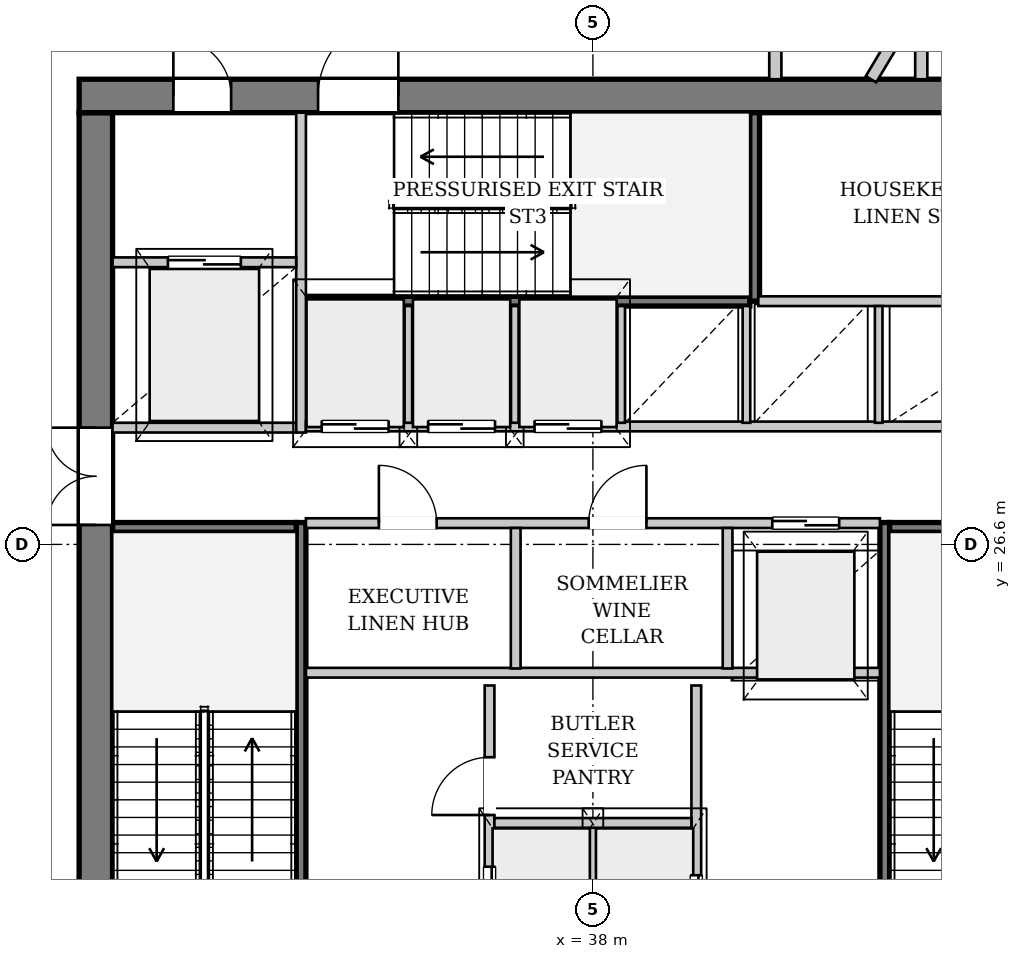
"""IFC4 building model, lengths in metres.
Left out: names, types, materials, properties, quantities, classifications, styles, units other than length and angle.
Written with IfcOpenShell. Run it as: python <this file> out.ifc"""

import sys

from ifc_helpers import new_model, si_unit, direction, frame, frame_2d, origin, place, context, subcontext, project, spatial, rectangle, extrude, source, transform, mapped, element, fill, save


model = new_model("IFC4")
c1 = context("Model", 3, precision=1e-05, world=origin(), true_north=direction((0.0, 1.0)))
c2 = subcontext(c1, "Body", "Model", "MODEL_VIEW")
j1 = project(units=[si_unit("LENGTHUNIT", "METRE"), si_unit("PLANEANGLEUNIT", "RADIAN")], contexts=[c1])
p1 = place(None, origin())
s1 = spatial("IfcSite", under=j1, at=p1, CompositionType="ELEMENT")
p2 = place(p1, origin())
s2 = spatial("IfcBuilding", under=s1, at=p2, CompositionType="ELEMENT")
p3 = place(p2, frame((0.0, 0.0, 182.1)))
s3 = spatial("IfcBuildingStorey", under=s2, at=p3, CompositionType="ELEMENT", Elevation=182.1)
p4 = place(p3, frame((53.031, 21.293, 0.0), z_axis=(0.0, 0.0, 1.0), x_axis=(-0.601886435851, -0.798581691713, 0.0)))
e1 = element("IfcWall", 1, at=p4, inside=s3, PredefinedType="SOLIDWALL", context=c2, shape_type="SweptSolid", body=[
    extrude(rectangle(XDim=23.316, YDim=0.32, at=frame_2d((11.658, 0.0))), origin(), (0.0, 0.0, 1.0), 2.722),
])
p5 = place(p4, frame((6.261, 0.0, 0.0)))
e2 = element("IfcOpeningElement", 2, at=p5, cuts=e1, PredefinedType="OPENING", context=c2, shape_type="SweptSolid", body=[
    extrude(rectangle(XDim=1.5, YDim=2.3, at=frame_2d((0.75, 1.15))), frame((0.0, 0.17, 0.0), z_axis=(0.0, -1.0, 0.0), x_axis=(1.0, 0.0, 0.0)), (0.0, 0.0, 1.0), 0.34),
])
p6 = place(p4, frame((15.954, 0.0, 0.252)))
e3 = element("IfcOpeningElement", 3, at=p6, cuts=e1, PredefinedType="OPENING", context=c2, shape_type="SweptSolid", body=[
    extrude(rectangle(XDim=2.6, YDim=2.35, at=frame_2d((1.3, 1.175))), frame((0.0, 0.17, 0.0), z_axis=(0.0, -1.0, 0.0), x_axis=(1.0, 0.0, 0.0)), (0.0, 0.0, 1.0), 0.34),
])
p7 = place(p3, frame((29.825, 19.5, 0.0), z_axis=(0.0, 0.0, 1.0), x_axis=(0.0, 1.0, 0.0)))
e4 = element("IfcWall", 4, at=p7, inside=s3, PredefinedType="SHEAR", context=c2, shape_type="SweptSolid", body=[
    extrude(rectangle(XDim=14.2, YDim=0.55, at=frame_2d((7.1, 0.0))), origin(), (0.0, 0.0, 1.0), 3.33),
])
p8 = place(p7, frame((7.42, 0.0, 0.0)))
e5 = element("IfcOpeningElement", 5, at=p8, cuts=e4, PredefinedType="OPENING", context=c2, shape_type="SweptSolid", body=[
    extrude(rectangle(XDim=1.6, YDim=2.2, at=frame_2d((0.8, 1.1))), frame((0.0, 0.285, 0.0), z_axis=(0.0, -1.0, 0.0), x_axis=(1.0, 0.0, 0.0)), (0.0, 0.0, 1.0), 0.57),
])
p9 = place(p3, frame((29.55, 33.975, 0.0), z_axis=(0.0, 0.0, 1.0), x_axis=(1.0, 0.0, 0.0)))
e6 = element("IfcWall", 6, at=p9, inside=s3, PredefinedType="SHEAR", context=c2, shape_type="SweptSolid", body=[
    extrude(rectangle(XDim=16.9, YDim=0.55, at=frame_2d((8.45, 0.0))), origin(), (0.0, 0.0, 1.0), 3.33),
])
p10 = place(p9, frame((1.55, 0.0, 0.0)))
e7 = element("IfcOpeningElement", 7, at=p10, cuts=e6, PredefinedType="OPENING", context=c2, shape_type="SweptSolid", body=[
    extrude(rectangle(XDim=0.95, YDim=2.1, at=frame_2d((0.475, 1.05))), frame((0.0, 0.285, 0.0), z_axis=(0.0, -1.0, 0.0), x_axis=(1.0, 0.0, 0.0)), (0.0, 0.0, 1.0), 0.57),
])
p11 = place(p9, frame((3.93, 0.0, 0.0)))
e8 = element("IfcOpeningElement", 8, at=p11, cuts=e6, PredefinedType="OPENING", context=c2, shape_type="SweptSolid", body=[
    extrude(rectangle(XDim=1.32, YDim=2.2, at=frame_2d((0.66, 1.1))), frame((0.0, 0.285, 0.0), z_axis=(0.0, -1.0, 0.0), x_axis=(1.0, 0.0, 0.0)), (0.0, 0.0, 1.0), 0.57),
])
p12 = place(p3, frame((33.2, 19.5, 0.0), z_axis=(0.0, 0.0, 1.0), x_axis=(0.0, 1.0, 0.0)))
e9 = element("IfcWall", 9, at=p12, inside=s3, PredefinedType="PARTITIONING", context=c2, shape_type="SweptSolid", body=[
    extrude(rectangle(XDim=7.46, YDim=0.16, at=frame_2d((3.73, 0.0))), origin(), (0.0, 0.0, 1.0), 3.33),
])
p13 = place(p12, frame((0.08, 0.0, 0.0)))
e10 = element("IfcOpeningElement", 10, at=p13, cuts=e9, PredefinedType="OPENING", context=c2, shape_type="SweptSolid", body=[
    extrude(rectangle(XDim=1.32, YDim=2.2, at=frame_2d((0.66, 1.1))), frame((0.0, 0.09, 0.0), z_axis=(0.0, -1.0, 0.0), x_axis=(1.0, 0.0, 0.0)), (0.0, 0.0, 1.0), 0.18),
])
p14 = place(p3, frame((30.1, 26.88, 0.0), z_axis=(0.0, 0.0, 1.0), x_axis=(1.0, 0.0, 0.0)))
e11 = element("IfcWall", 11, at=p14, inside=s3, PredefinedType="PARTITIONING", context=c2, shape_type="SweptSolid", body=[
    extrude(rectangle(XDim=3.02, YDim=0.16, at=frame_2d((1.51, 0.0))), origin(), (0.0, 0.0, 1.0), 3.33),
])
p15 = place(p3, frame((42.8, 26.96, 0.0), z_axis=(0.0, 0.0, 1.0), x_axis=(0.0, -1.0, 0.0)))
e12 = element("IfcWall", 12, at=p15, inside=s3, PredefinedType="PARTITIONING", context=c2, shape_type="SweptSolid", body=[
    extrude(rectangle(XDim=7.46, YDim=0.16, at=frame_2d((3.73, 0.0))), origin(), (0.0, 0.0, 1.0), 3.33),
])
p16 = place(p15, frame((6.06, 0.0, 0.0)))
e13 = element("IfcOpeningElement", 13, at=p16, cuts=e12, PredefinedType="OPENING", context=c2, shape_type="SweptSolid", body=[
    extrude(rectangle(XDim=1.32, YDim=2.2, at=frame_2d((0.66, 1.1))), frame((0.0, 0.09, 0.0), z_axis=(0.0, -1.0, 0.0), x_axis=(1.0, 0.0, 0.0)), (0.0, 0.0, 1.0), 0.18),
])
p17 = place(p3, frame((42.88, 26.88, 0.0), z_axis=(0.0, 0.0, 1.0), x_axis=(1.0, 0.0, 0.0)))
e14 = element("IfcWall", 14, at=p17, inside=s3, PredefinedType="PARTITIONING", context=c2, shape_type="SweptSolid", body=[
    extrude(rectangle(XDim=3.02, YDim=0.16, at=frame_2d((1.51, 0.0))), origin(), (0.0, 0.0, 1.0), 3.33),
])
p18 = place(p3, frame((33.28, 30.6, 0.0), z_axis=(0.0, 0.0, 1.0), x_axis=(1.0, 0.0, 0.0)))
e15 = element("IfcWall", 15, at=p18, inside=s3, PredefinedType="PARTITIONING", context=c2, shape_type="SweptSolid", body=[
    extrude(rectangle(XDim=7.3, YDim=0.16, at=frame_2d((3.65, 0.0))), origin(), (0.0, 0.0, 1.0), 3.33),
])
p19 = place(p3, frame((40.66, 30.6, 0.0), z_axis=(0.0, 0.0, 1.0), x_axis=(0.0, 1.0, 0.0)))
e16 = element("IfcWall", 16, at=p19, inside=s3, PredefinedType="PARTITIONING", context=c2, shape_type="SweptSolid", body=[
    extrude(rectangle(XDim=3.1, YDim=0.16, at=frame_2d((1.55, 0.0))), origin(), (0.0, 0.0, 1.0), 3.33),
])
p20 = place(p3, frame((36.3, 19.5, 0.0), z_axis=(0.0, 0.0, 1.0), x_axis=(0.0, 1.0, 0.0)))
e17 = element("IfcWall", 17, at=p20, inside=s3, PredefinedType="PARTITIONING", context=c2, shape_type="SweptSolid", body=[
    extrude(rectangle(XDim=4.78, YDim=0.16, at=frame_2d((2.39, 0.0))), origin(), (0.0, 0.0, 1.0), 3.33),
])
p21 = place(p20, frame((0.6, 0.0, 0.0)))
e18 = element("IfcOpeningElement", 18, at=p21, cuts=e17, PredefinedType="OPENING", context=c2, shape_type="SweptSolid", body=[
    extrude(rectangle(XDim=1.2, YDim=2.2, at=frame_2d((0.6, 1.1))), frame((0.0, 0.09, 0.0), z_axis=(0.0, -1.0, 0.0), x_axis=(1.0, 0.0, 0.0)), (0.0, 0.0, 1.0), 0.18),
])
p22 = place(p20, frame((2.65, 0.0, 0.0)))
e19 = element("IfcOpeningElement", 19, at=p22, cuts=e17, PredefinedType="OPENING", context=c2, shape_type="SweptSolid", body=[
    extrude(rectangle(XDim=0.95, YDim=2.1, at=frame_2d((0.475, 1.05))), frame((0.0, 0.09, 0.0), z_axis=(0.0, -1.0, 0.0), x_axis=(1.0, 0.0, 0.0)), (0.0, 0.0, 1.0), 0.18),
])
p23 = place(p3, frame((39.7, 24.28, 0.0), z_axis=(0.0, 0.0, 1.0), x_axis=(0.0, -1.0, 0.0)))
e20 = element("IfcWall", 20, at=p23, inside=s3, PredefinedType="PARTITIONING", context=c2, shape_type="SweptSolid", body=[
    extrude(rectangle(XDim=4.78, YDim=0.16, at=frame_2d((2.39, 0.0))), origin(), (0.0, 0.0, 1.0), 3.33),
])
p24 = place(p23, frame((3.12, 0.0, 0.0)))
e21 = element("IfcOpeningElement", 21, at=p24, cuts=e20, PredefinedType="OPENING", context=c2, shape_type="SweptSolid", body=[
    extrude(rectangle(XDim=1.2, YDim=2.2, at=frame_2d((0.6, 1.1))), frame((0.0, 0.09, 0.0), z_axis=(0.0, -1.0, 0.0), x_axis=(1.0, 0.0, 0.0)), (0.0, 0.0, 1.0), 0.18),
])
p25 = place(p3, frame((38.0, 19.5, 0.0), z_axis=(0.0, 0.0, 1.0), x_axis=(0.0, 1.0, 0.0)))
e22 = element("IfcWall", 22, at=p25, inside=s3, PredefinedType="PARTITIONING", context=c2, shape_type="SweptSolid", body=[
    extrude(rectangle(XDim=2.46, YDim=0.125, at=frame_2d((1.23, 0.0))), origin(), (0.0, 0.0, 1.0), 3.33),
])
p26 = place(p3, frame((36.38, 22.02, 0.0), z_axis=(0.0, 0.0, 1.0), x_axis=(1.0, 0.0, 0.0)))
e23 = element("IfcWall", 23, at=p26, inside=s3, PredefinedType="PARTITIONING", context=c2, shape_type="SweptSolid", body=[
    extrude(rectangle(XDim=3.24, YDim=0.16, at=frame_2d((1.62, 0.0))), origin(), (0.0, 0.0, 1.0), 3.33),
])
p27 = place(p3, frame((33.28, 24.49, 0.0), z_axis=(0.0, 0.0, 1.0), x_axis=(1.0, 0.0, 0.0)))
e24 = element("IfcWall", 24, at=p27, inside=s3, PredefinedType="PARTITIONING", context=c2, shape_type="SweptSolid", body=[
    extrude(rectangle(XDim=9.44, YDim=0.16, at=frame_2d((4.72, 0.0))), origin(), (0.0, 0.0, 1.0), 3.33),
])
p28 = place(p3, frame((30.1, 28.52, 0.0), z_axis=(0.0, 0.0, 1.0), x_axis=(1.0, 0.0, 0.0)))
e25 = element("IfcWall", 25, at=p28, inside=s3, PredefinedType="PARTITIONING", context=c2, shape_type="SweptSolid", body=[
    extrude(rectangle(XDim=3.02, YDim=0.16, at=frame_2d((1.51, 0.0))), origin(), (0.0, 0.0, 1.0), 3.33),
])
p29 = place(p3, frame((33.2, 28.44, 0.0), z_axis=(0.0, 0.0, 1.0), x_axis=(0.0, 1.0, 0.0)))
e26 = element("IfcWall", 26, at=p29, inside=s3, PredefinedType="PARTITIONING", context=c2, shape_type="SweptSolid", body=[
    extrude(rectangle(XDim=5.26, YDim=0.16, at=frame_2d((2.63, 0.0))), origin(), (0.0, 0.0, 1.0), 3.33),
])
p30 = place(p3, frame((30.1, 31.24, 0.0), z_axis=(0.0, 0.0, 1.0), x_axis=(1.0, 0.0, 0.0)))
e27 = element("IfcWall", 27, at=p30, inside=s3, PredefinedType="PARTITIONING", context=c2, shape_type="SweptSolid", body=[
    extrude(rectangle(XDim=3.02, YDim=0.16, at=frame_2d((1.51, 0.0))), origin(), (0.0, 0.0, 1.0), 3.33),
])
p31 = place(p30, frame((0.91, 0.0, 0.0)))
e28 = element("IfcOpeningElement", 28, at=p31, cuts=e27, PredefinedType="OPENING", context=c2, shape_type="SweptSolid", body=[
    extrude(rectangle(XDim=1.2, YDim=2.2, at=frame_2d((0.6, 1.1))), frame((0.0, 0.09, 0.0), z_axis=(0.0, -1.0, 0.0), x_axis=(1.0, 0.0, 0.0)), (0.0, 0.0, 1.0), 0.18),
])
p32 = place(p3, frame((33.28, 26.95, 0.0), z_axis=(0.0, 0.0, 1.0), x_axis=(1.0, 0.0, 0.0)))
e29 = element("IfcWall", 29, at=p32, inside=s3, PredefinedType="PARTITIONING", context=c2, shape_type="SweptSolid", body=[
    extrude(rectangle(XDim=9.44, YDim=0.16, at=frame_2d((4.72, 0.0))), origin(), (0.0, 0.0, 1.0), 3.33),
])
p33 = place(p32, frame((1.2, 0.0, 0.0)))
e30 = element("IfcOpeningElement", 30, at=p33, cuts=e29, PredefinedType="OPENING", context=c2, shape_type="SweptSolid", body=[
    extrude(rectangle(XDim=0.95, YDim=2.1, at=frame_2d((0.475, 1.05))), frame((0.0, 0.09, 0.0), z_axis=(0.0, -1.0, 0.0), x_axis=(1.0, 0.0, 0.0)), (0.0, 0.0, 1.0), 0.18),
])
p34 = place(p32, frame((4.65, 0.0, 0.0)))
e31 = element("IfcOpeningElement", 31, at=p34, cuts=e29, PredefinedType="OPENING", context=c2, shape_type="SweptSolid", body=[
    extrude(rectangle(XDim=0.95, YDim=2.1, at=frame_2d((0.475, 1.05))), frame((0.0, 0.09, 0.0), z_axis=(0.0, -1.0, 0.0), x_axis=(1.0, 0.0, 0.0)), (0.0, 0.0, 1.0), 0.18),
])
p35 = place(p32, frame((7.67, 0.0, 0.0)))
e32 = element("IfcOpeningElement", 32, at=p35, cuts=e29, PredefinedType="OPENING", context=c2, shape_type="SweptSolid", body=[
    extrude(rectangle(XDim=1.1, YDim=2.2, at=frame_2d((0.55, 1.1))), frame((0.0, 0.09, 0.0), z_axis=(0.0, -1.0, 0.0), x_axis=(1.0, 0.0, 0.0)), (0.0, 0.0, 1.0), 0.18),
])
for number, where, z_axis, x_axis in (
    (33, (36.73, 24.56, 0.0), (0.0, 0.0, 1.0), (0.0, 1.0, 0.0)),
    (34, (40.215, 24.56, 0.0), (0.0, 0.0, 1.0), (0.0, 1.0, 0.0)),
):
    element("IfcWall", number, at=place(p3, frame(where, z_axis=z_axis, x_axis=x_axis)), inside=s3, PredefinedType="PARTITIONING", context=c2, shape_type="SweptSolid", body=[
        extrude(rectangle(XDim=2.31, YDim=0.16, at=frame_2d((1.155, 0.0))), origin(), (0.0, 0.0, 1.0), 3.33),
    ])
p36 = place(p3, frame((33.28, 28.54, 0.0), z_axis=(0.0, 0.0, 1.0), x_axis=(1.0, 0.0, 0.0)))
e35 = element("IfcWall", 35, at=p36, inside=s3, PredefinedType="PARTITIONING", context=c2, shape_type="SweptSolid", body=[
    extrude(rectangle(XDim=12.62, YDim=0.16, at=frame_2d((6.31, 0.0))), origin(), (0.0, 0.0, 1.0), 3.33),
])
p37 = place(p36, frame((0.26, 0.0, 0.0)))
e36 = element("IfcOpeningElement", 36, at=p37, cuts=e35, PredefinedType="OPENING", context=c2, shape_type="SweptSolid", body=[
    extrude(rectangle(XDim=1.1, YDim=2.2, at=frame_2d((0.55, 1.1))), frame((0.0, 0.09, 0.0), z_axis=(0.0, -1.0, 0.0), x_axis=(1.0, 0.0, 0.0)), (0.0, 0.0, 1.0), 0.18),
])
p38 = place(p36, frame((2.01, 0.0, 0.0)))
e37 = element("IfcOpeningElement", 37, at=p38, cuts=e35, PredefinedType="OPENING", context=c2, shape_type="SweptSolid", body=[
    extrude(rectangle(XDim=1.1, YDim=2.2, at=frame_2d((0.55, 1.1))), frame((0.0, 0.09, 0.0), z_axis=(0.0, -1.0, 0.0), x_axis=(1.0, 0.0, 0.0)), (0.0, 0.0, 1.0), 0.18),
])
p39 = place(p36, frame((3.76, 0.0, 0.0)))
e38 = element("IfcOpeningElement", 38, at=p39, cuts=e35, PredefinedType="OPENING", context=c2, shape_type="SweptSolid", body=[
    extrude(rectangle(XDim=1.1, YDim=2.2, at=frame_2d((0.55, 1.1))), frame((0.0, 0.09, 0.0), z_axis=(0.0, -1.0, 0.0), x_axis=(1.0, 0.0, 0.0)), (0.0, 0.0, 1.0), 0.18),
])
p40 = place(p3, frame((40.72, 30.6, 0.0), z_axis=(0.0, 0.0, 1.0), x_axis=(1.0, 0.0, 0.0)))
e39 = element("IfcWall", 39, at=p40, inside=s3, PredefinedType="PARTITIONING", context=c2, shape_type="SweptSolid", body=[
    extrude(rectangle(XDim=5.18, YDim=0.16, at=frame_2d((2.59, 0.0))), origin(), (0.0, 0.0, 1.0), 3.33),
])
for number, where, z_axis, x_axis in (
    (40, (34.965, 28.6, 0.0), (0.0, 0.0, 1.0), (0.0, 1.0, 0.0)),
    (41, (36.715, 28.6, 0.0), (0.0, 0.0, 1.0), (0.0, 1.0, 0.0)),
    (42, (38.465, 28.6, 0.0), (0.0, 0.0, 1.0), (0.0, 1.0, 0.0)),
    (43, (40.525, 28.6, 0.0), (0.0, 0.0, 1.0), (0.0, 1.0, 0.0)),
    (44, (42.7, 28.6, 0.0), (0.0, 0.0, 1.0), (0.0, 1.0, 0.0)),
):
    element("IfcWall", number, at=place(p3, frame(where, z_axis=z_axis, x_axis=x_axis)), inside=s3, PredefinedType="PARTITIONING", context=c2, shape_type="SweptSolid", body=[
        extrude(rectangle(XDim=1.92, YDim=0.125, at=frame_2d((0.96, 0.0))), origin(), (0.0, 0.0, 1.0), 3.33),
    ])
p41 = place(p3, frame((42.573, 34.25, 0.0), z_axis=(0.0, 0.0, 1.0), x_axis=(0.513135248782, 0.858307763251, 0.0)))
e45 = element("IfcWall", 45, at=p41, inside=s3, PredefinedType="PARTITIONING", context=c2, shape_type="SweptSolid", body=[
    extrude(rectangle(XDim=1.611, YDim=0.2, at=frame_2d((0.805, 0.0))), origin(), (0.0, 0.0, 1.0), 3.33),
])
for number, where, z_axis, x_axis in (
    (46, (41.0, 34.25, 0.0), (0.0, 0.0, 1.0), (0.0, 1.0, 0.0)),
    (47, (43.4, 34.25, 0.0), (0.0, 0.0, 1.0), (0.0, 1.0, 0.0)),
):
    element("IfcWall", number, at=place(p3, frame(where, z_axis=z_axis, x_axis=x_axis)), inside=s3, PredefinedType="PARTITIONING", context=c2, shape_type="SweptSolid", body=[
        extrude(rectangle(XDim=1.95, YDim=0.2, at=frame_2d((0.975, 0.0))), origin(), (0.0, 0.0, 1.0), 3.33),
    ])
m1 = source(origin(), c2, "Body", "SweptSolid", [
    extrude(rectangle(XDim=1.6, YDim=2.2, at=frame_2d((0.8, 1.1))), frame((0.0, 0.025, 0.0), z_axis=(0.0, -1.0, 0.0), x_axis=(1.0, 0.0, 0.0)), (0.0, 0.0, 1.0), 0.05),
])
p42 = place(p8, origin())
e48 = element("IfcDoor", 48, at=p42, inside=s3, OperationType="DOUBLE_DOOR_SINGLE_SWING", PredefinedType="DOOR", context=c2, shape_type="MappedRepresentation", body=[
    mapped(m1, transform((0.0, 0.0, 0.0), x_axis=(1.0, 0.0, 0.0), y_axis=(0.0, 1.0, 0.0), z_axis=(0.0, 0.0, 1.0), scale=1.0)),
])
fill(e5, e48)
m2 = source(origin(), c2, "Body", "SweptSolid", [
    extrude(rectangle(XDim=0.95, YDim=2.1, at=frame_2d((0.475, 1.05))), frame((0.0, 0.025, 0.0), z_axis=(0.0, -1.0, 0.0), x_axis=(1.0, 0.0, 0.0)), (0.0, 0.0, 1.0), 0.05),
])
p43 = place(p10, origin())
e49 = element("IfcDoor", 49, at=p43, inside=s3, OperationType="SINGLE_SWING_LEFT", PredefinedType="DOOR", context=c2, shape_type="MappedRepresentation", body=[
    mapped(m2, transform((0.0, 0.0, 0.0), x_axis=(1.0, 0.0, 0.0), y_axis=(0.0, 1.0, 0.0), z_axis=(0.0, 0.0, 1.0), scale=1.0)),
])
fill(e7, e49)
m3 = source(origin(), c2, "Body", "SweptSolid", [
    extrude(rectangle(XDim=1.32, YDim=2.2, at=frame_2d((0.66, 1.1))), frame((0.0, 0.025, 0.0), z_axis=(0.0, -1.0, 0.0), x_axis=(1.0, 0.0, 0.0)), (0.0, 0.0, 1.0), 0.05),
])
p44 = place(p11, origin())
e50 = element("IfcDoor", 50, at=p44, inside=s3, OperationType="SINGLE_SWING_RIGHT", PredefinedType="DOOR", context=c2, shape_type="MappedRepresentation", body=[
    mapped(m3, transform((0.0, 0.0, 0.0), x_axis=(1.0, 0.0, 0.0), y_axis=(0.0, 1.0, 0.0), z_axis=(0.0, 0.0, 1.0), scale=1.0)),
])
fill(e8, e50)
m4 = source(origin(), c2, "Body", "SweptSolid", [
    extrude(rectangle(XDim=1.2, YDim=2.2, at=frame_2d((0.6, 1.1))), frame((0.0, 0.025, 0.0), z_axis=(0.0, -1.0, 0.0), x_axis=(1.0, 0.0, 0.0)), (0.0, 0.0, 1.0), 0.05),
])
p45 = place(p21, origin())
e51 = element("IfcDoor", 51, at=p45, inside=s3, OperationType="DOUBLE_DOOR_SLIDING", PredefinedType="DOOR", context=c2, shape_type="MappedRepresentation", body=[
    mapped(m4, transform((0.0, 0.0, 0.0), x_axis=(1.0, 0.0, 0.0), y_axis=(0.0, 1.0, 0.0), z_axis=(0.0, 0.0, 1.0), scale=1.0)),
])
fill(e18, e51)
p46 = place(p22, origin())
e52 = element("IfcDoor", 52, at=p46, inside=s3, OperationType="SINGLE_SWING_LEFT", PredefinedType="DOOR", context=c2, shape_type="MappedRepresentation", body=[
    mapped(m2, transform((0.0, 0.0, 0.0), x_axis=(1.0, 0.0, 0.0), y_axis=(0.0, 1.0, 0.0), z_axis=(0.0, 0.0, 1.0), scale=1.0)),
])
fill(e19, e52)
p47 = place(p24, origin())
e53 = element("IfcDoor", 53, at=p47, inside=s3, OperationType="DOUBLE_DOOR_SLIDING", PredefinedType="DOOR", context=c2, shape_type="MappedRepresentation", body=[
    mapped(m4, transform((0.0, 0.0, 0.0), x_axis=(1.0, 0.0, 0.0), y_axis=(0.0, 1.0, 0.0), z_axis=(0.0, 0.0, 1.0), scale=1.0)),
])
fill(e21, e53)
p48 = place(p31, origin())
e54 = element("IfcDoor", 54, at=p48, inside=s3, OperationType="DOUBLE_DOOR_SLIDING", PredefinedType="DOOR", context=c2, shape_type="MappedRepresentation", body=[
    mapped(m4, transform((0.0, 0.0, 0.0), x_axis=(1.0, 0.0, 0.0), y_axis=(0.0, 1.0, 0.0), z_axis=(0.0, 0.0, 1.0), scale=1.0)),
])
fill(e28, e54)
p49 = place(p33, origin())
e55 = element("IfcDoor", 55, at=p49, inside=s3, OperationType="SINGLE_SWING_LEFT", PredefinedType="DOOR", context=c2, shape_type="MappedRepresentation", body=[
    mapped(m2, transform((0.0, 0.0, 0.0), x_axis=(1.0, 0.0, 0.0), y_axis=(0.0, 1.0, 0.0), z_axis=(0.0, 0.0, 1.0), scale=1.0)),
])
fill(e30, e55)
p50 = place(p34, origin())
e56 = element("IfcDoor", 56, at=p50, inside=s3, OperationType="SINGLE_SWING_RIGHT", PredefinedType="DOOR", context=c2, shape_type="MappedRepresentation", body=[
    mapped(m2, transform((0.0, 0.0, 0.0), x_axis=(1.0, 0.0, 0.0), y_axis=(0.0, 1.0, 0.0), z_axis=(0.0, 0.0, 1.0), scale=1.0)),
])
fill(e31, e56)
m5 = source(origin(), c2, "Body", "SweptSolid", [
    extrude(rectangle(XDim=1.1, YDim=2.2, at=frame_2d((0.55, 1.1))), frame((0.0, 0.025, 0.0), z_axis=(0.0, -1.0, 0.0), x_axis=(1.0, 0.0, 0.0)), (0.0, 0.0, 1.0), 0.05),
])
p51 = place(p35, origin())
e57 = element("IfcDoor", 57, at=p51, inside=s3, OperationType="DOUBLE_DOOR_SLIDING", PredefinedType="DOOR", context=c2, shape_type="MappedRepresentation", body=[
    mapped(m5, transform((0.0, 0.0, 0.0), x_axis=(1.0, 0.0, 0.0), y_axis=(0.0, 1.0, 0.0), z_axis=(0.0, 0.0, 1.0), scale=1.0)),
])
fill(e32, e57)
p52 = place(p37, origin())
e58 = element("IfcDoor", 58, at=p52, inside=s3, OperationType="DOUBLE_DOOR_SLIDING", PredefinedType="DOOR", context=c2, shape_type="MappedRepresentation", body=[
    mapped(m5, transform((0.0, 0.0, 0.0), x_axis=(1.0, 0.0, 0.0), y_axis=(0.0, 1.0, 0.0), z_axis=(0.0, 0.0, 1.0), scale=1.0)),
])
fill(e36, e58)
p53 = place(p38, origin())
e59 = element("IfcDoor", 59, at=p53, inside=s3, OperationType="DOUBLE_DOOR_SLIDING", PredefinedType="DOOR", context=c2, shape_type="MappedRepresentation", body=[
    mapped(m5, transform((0.0, 0.0, 0.0), x_axis=(1.0, 0.0, 0.0), y_axis=(0.0, 1.0, 0.0), z_axis=(0.0, 0.0, 1.0), scale=1.0)),
])
fill(e37, e59)
p54 = place(p39, origin())
e60 = element("IfcDoor", 60, at=p54, inside=s3, OperationType="DOUBLE_DOOR_SLIDING", PredefinedType="DOOR", context=c2, shape_type="MappedRepresentation", body=[
    mapped(m5, transform((0.0, 0.0, 0.0), x_axis=(1.0, 0.0, 0.0), y_axis=(0.0, 1.0, 0.0), z_axis=(0.0, 0.0, 1.0), scale=1.0)),
])
fill(e38, e60)
save(model, sys.argv[1])
